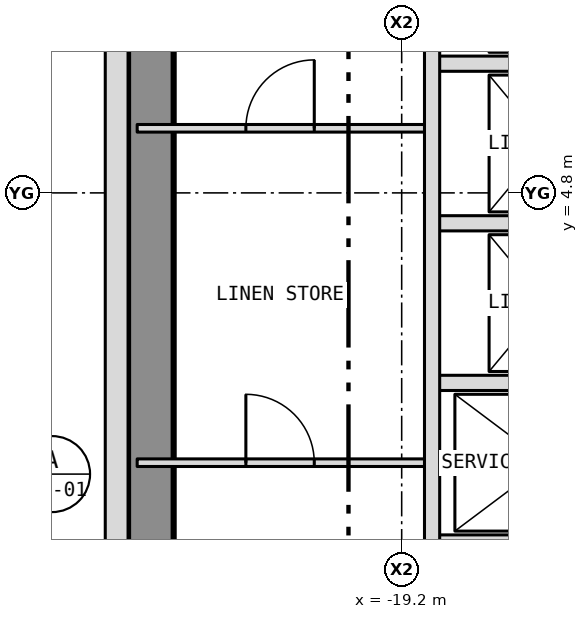
"""IFC4 building model, lengths in metres.
Left out: names, types, materials, properties, quantities, classifications, styles, units other than length and angle.
Written with IfcOpenShell. Run it as: python <this file> out.ifc"""

import sys

from ifc_helpers import new_model, si_unit, direction, frame, frame_2d, origin, place, context, subcontext, project, spatial, rectangle, extrude, element, fill, save


model = new_model("IFC4")
c1 = context("Model", 3, precision=1e-05, world=origin(), true_north=direction((0.0, 1.0)))
c2 = subcontext(c1, "Body", "Model", "MODEL_VIEW")
j1 = project(units=[si_unit("LENGTHUNIT", "METRE"), si_unit("PLANEANGLEUNIT", "RADIAN")], contexts=[c1])
p1 = place(None, origin())
s1 = spatial("IfcSite", under=j1, at=p1, CompositionType="ELEMENT")
p2 = place(p1, origin())
s2 = spatial("IfcBuilding", under=s1, at=p2, CompositionType="ELEMENT")
p3 = place(p2, frame((0.0, 0.0, 113.5)))
s3 = spatial("IfcBuildingStorey", under=s2, at=p3, CompositionType="ELEMENT", Elevation=113.5)
p4 = place(p3, frame((-22.5, -10.8, 0.0), z_axis=(0.0, 0.0, 1.0), x_axis=(0.0, 1.0, 0.0)))
e1 = element("IfcWall", 1, at=p4, inside=s3, PredefinedType="SHEAR", context=c2, shape_type="SweptSolid", body=[
    extrude(rectangle(XDim=21.6, YDim=0.6, at=frame_2d((10.8, 0.0))), origin(), (0.0, 0.0, 1.0), 3.25),
])
p5 = place(p3, frame((-22.95, 10.8, 0.0), z_axis=(0.0, 0.0, 1.0), x_axis=(0.0, -1.0, 0.0)))
e2 = element("IfcWall", 2, at=p5, inside=s3, PredefinedType="SOLIDWALL", context=c2, shape_type="SweptSolid", body=[
    extrude(rectangle(XDim=21.6, YDim=0.3, at=frame_2d((10.8, 0.0))), origin(), (0.0, 0.0, 1.0), 3.5),
])
p6 = place(p5, frame((18.05, 0.0, 1.0)))
e3 = element("IfcOpeningElement", 3, at=p6, cuts=e2, PredefinedType="OPENING", context=c2, shape_type="SweptSolid", body=[
    extrude(rectangle(XDim=0.6, YDim=1.5, at=frame_2d((0.3, 0.75))), frame((0.0, 0.162, 0.0), z_axis=(0.0, -1.0, 0.0), x_axis=(1.0, 0.0, 0.0)), (0.0, 0.0, 1.0), 0.324),
])
p7 = place(p3, frame((-18.8, 0.2, 0.0), z_axis=(0.0, 0.0, 1.0), x_axis=(1.0, 0.0, 0.0)))
e4 = element("IfcWall", 4, at=p7, inside=s3, PredefinedType="PARTITIONING", context=c2, shape_type="SweptSolid", body=[
    extrude(rectangle(XDim=2.88, YDim=0.2, at=frame_2d((1.44, 0.0))), origin(), (0.0, 0.0, 1.0), 3.25),
])
p8 = place(p3, frame((-22.68, 1.25, 0.0), z_axis=(0.0, 0.0, 1.0), x_axis=(1.0, 0.0, 0.0)))
e5 = element("IfcWall", 5, at=p8, inside=s3, PredefinedType="PARTITIONING", context=c2, shape_type="SweptSolid", body=[
    extrude(rectangle(XDim=3.88, YDim=0.1, at=frame_2d((1.94, 0.0))), origin(), (0.0, 0.0, 1.0), 3.25),
])
p9 = place(p8, frame((1.43, 0.0, 0.0)))
e6 = element("IfcOpeningElement", 6, at=p9, cuts=e5, PredefinedType="OPENING", context=c2, shape_type="SweptSolid", body=[
    extrude(rectangle(XDim=0.9, YDim=2.1, at=frame_2d((0.45, 1.05))), frame((0.0, 0.062, 0.0), z_axis=(0.0, -1.0, 0.0), x_axis=(1.0, 0.0, 0.0)), (0.0, 0.0, 1.0), 0.124),
])
for number, where, z_axis, x_axis in (
    (7, (-18.8, 2.3, 0.0), (0.0, 0.0, 1.0), (1.0, 0.0, 0.0)),
    (8, (-18.8, 4.4, 0.0), (0.0, 0.0, 1.0), (1.0, 0.0, 0.0)),
):
    element("IfcWall", number, at=place(p3, frame(where, z_axis=z_axis, x_axis=x_axis)), inside=s3, PredefinedType="PARTITIONING", context=c2, shape_type="SweptSolid", body=[
        extrude(rectangle(XDim=2.88, YDim=0.2, at=frame_2d((1.44, 0.0))), origin(), (0.0, 0.0, 1.0), 3.25),
    ])
p10 = place(p3, frame((-22.68, 5.65, 0.0), z_axis=(0.0, 0.0, 1.0), x_axis=(1.0, 0.0, 0.0)))
e9 = element("IfcWall", 9, at=p10, inside=s3, PredefinedType="PARTITIONING", context=c2, shape_type="SweptSolid", body=[
    extrude(rectangle(XDim=3.88, YDim=0.1, at=frame_2d((1.94, 0.0))), origin(), (0.0, 0.0, 1.0), 3.25),
])
p11 = place(p10, frame((1.43, 0.0, 0.0)))
e10 = element("IfcOpeningElement", 10, at=p11, cuts=e9, PredefinedType="OPENING", context=c2, shape_type="SweptSolid", body=[
    extrude(rectangle(XDim=0.9, YDim=2.1, at=frame_2d((0.45, 1.05))), frame((0.0, 0.062, 0.0), z_axis=(0.0, -1.0, 0.0), x_axis=(1.0, 0.0, 0.0)), (0.0, 0.0, 1.0), 0.124),
])
p12 = place(p3, frame((-18.8, 6.5, 0.0), z_axis=(0.0, 0.0, 1.0), x_axis=(1.0, 0.0, 0.0)))
e11 = element("IfcWall", 11, at=p12, inside=s3, PredefinedType="PARTITIONING", context=c2, shape_type="SweptSolid", body=[
    extrude(rectangle(XDim=2.88, YDim=0.2, at=frame_2d((1.44, 0.0))), origin(), (0.0, 0.0, 1.0), 3.25),
])
p13 = place(p3, frame((-18.8, -1.8, 0.0), z_axis=(0.0, 0.0, 1.0), x_axis=(0.0, 1.0, 0.0)))
e12 = element("IfcWall", 12, at=p13, inside=s3, PredefinedType="PARTITIONING", context=c2, shape_type="SweptSolid", body=[
    extrude(rectangle(XDim=12.48, YDim=0.2, at=frame_2d((6.24, 0.0))), origin(), (0.0, 0.0, 1.0), 3.25),
])
p14 = place(p9, origin())
e13 = element("IfcDoor", 13, at=p14, inside=s3, OperationType="SINGLE_SWING_LEFT", PredefinedType="DOOR", context=c2, shape_type="SweptSolid", body=[
    extrude(rectangle(XDim=0.9, YDim=2.1, at=frame_2d((0.45, 1.05))), frame((0.0, 0.025, 0.0), z_axis=(0.0, -1.0, 0.0), x_axis=(1.0, 0.0, 0.0)), (0.0, 0.0, 1.0), 0.05),
])
fill(e6, e13)
p15 = place(p11, origin())
e14 = element("IfcDoor", 14, at=p15, inside=s3, OperationType="SINGLE_SWING_RIGHT", PredefinedType="DOOR", context=c2, shape_type="SweptSolid", body=[
    extrude(rectangle(XDim=0.9, YDim=2.1, at=frame_2d((0.45, 1.05))), frame((0.0, 0.025, 0.0), z_axis=(0.0, -1.0, 0.0), x_axis=(1.0, 0.0, 0.0)), (0.0, 0.0, 1.0), 0.05),
])
fill(e10, e14)
save(model, sys.argv[1])
